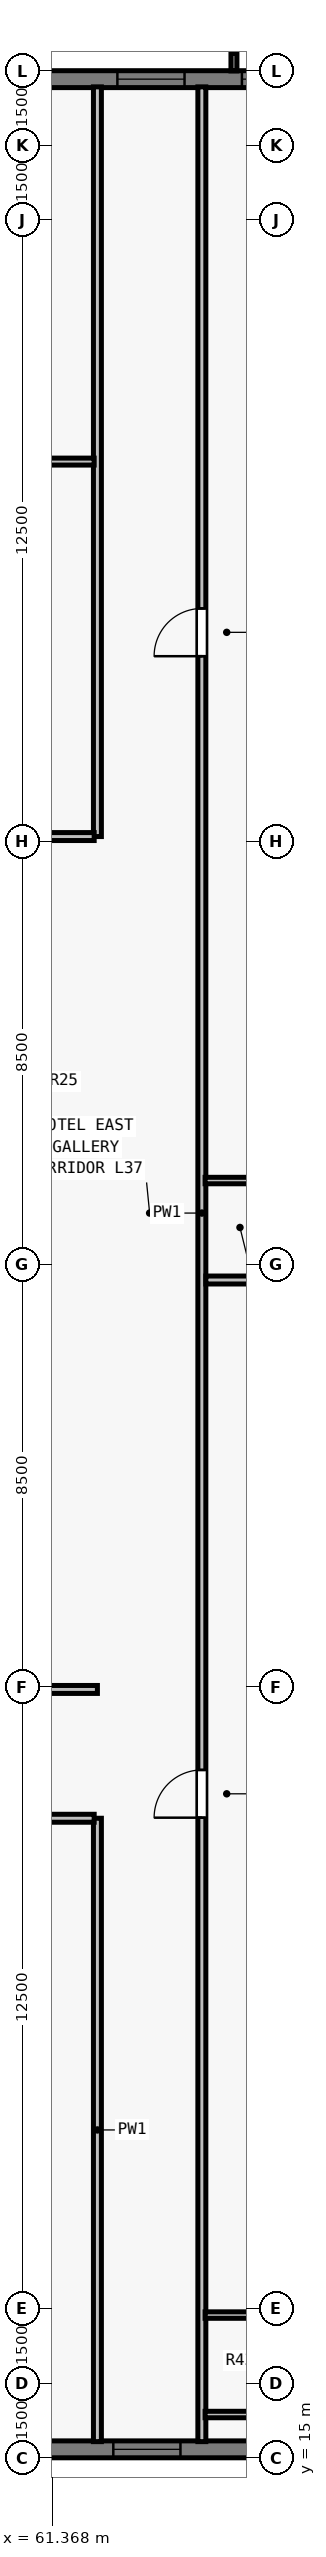
"""IFC4 building model, lengths in metres.
Left out: names, types, materials, properties, quantities, classifications, styles, units other than length and angle.
Written with IfcOpenShell. Run it as: python <this file> out.ifc"""

import sys

from ifc_helpers import new_model, si_unit, direction, frame, frame_2d, origin, place, context, subcontext, project, spatial, rectangle, extrude, element, fill, save


model = new_model("IFC4")
c1 = context("Model", 3, precision=1e-05, world=origin(), true_north=direction((0.0, 1.0)))
c2 = subcontext(c1, "Body", "Model", "MODEL_VIEW")
j1 = project(units=[si_unit("LENGTHUNIT", "METRE"), si_unit("PLANEANGLEUNIT", "RADIAN")], contexts=[c1])
p1 = place(None, origin())
s1 = spatial("IfcSite", under=j1, at=p1, CompositionType="ELEMENT")
p2 = place(p1, origin())
s2 = spatial("IfcBuilding", under=s1, at=p2, CompositionType="ELEMENT")
p3 = place(p2, frame((0.0, 0.0, 137.5)))
s3 = spatial("IfcBuildingStorey", under=s2, at=p3, CompositionType="ELEMENT", Elevation=137.5)
p4 = place(p3, frame((32.0, 62.83, 0.0), z_axis=(0.0, 0.0, 1.0), x_axis=(1.0, 0.0, 0.0)))
e1 = element("IfcWall", 1, at=p4, inside=s3, PredefinedType="SOLIDWALL", context=c2, shape_type="SweptSolid", body=[
    extrude(rectangle(XDim=39.682, YDim=0.34, at=frame_2d((19.841, 0.0))), origin(), (0.0, 0.0, 1.0), 3.28),
])
p5 = place(p4, frame((3.902, 0.0, 0.8)))
e2 = element("IfcOpeningElement", 2, at=p5, cuts=e1, PredefinedType="OPENING", context=c2, shape_type="SweptSolid", body=[
    extrude(rectangle(XDim=1.75, YDim=1.66, at=frame_2d((0.875, 0.83))), frame((0.0, 0.18, 0.0), z_axis=(0.0, -1.0, 0.0), x_axis=(1.0, 0.0, 0.0)), (0.0, 0.0, 1.0), 0.36),
])
p6 = place(p4, frame((8.505, 0.0, 0.8)))
e3 = element("IfcOpeningElement", 3, at=p6, cuts=e1, PredefinedType="OPENING", context=c2, shape_type="SweptSolid", body=[
    extrude(rectangle(XDim=1.35, YDim=1.66, at=frame_2d((0.675, 0.83))), frame((0.0, 0.18, 0.0), z_axis=(0.0, -1.0, 0.0), x_axis=(1.0, 0.0, 0.0)), (0.0, 0.0, 1.0), 0.36),
])
p7 = place(p4, frame((11.859, 0.0, 0.8)))
e4 = element("IfcOpeningElement", 4, at=p7, cuts=e1, PredefinedType="OPENING", context=c2, shape_type="SweptSolid", body=[
    extrude(rectangle(XDim=1.75, YDim=1.66, at=frame_2d((0.875, 0.83))), frame((0.0, 0.18, 0.0), z_axis=(0.0, -1.0, 0.0), x_axis=(1.0, 0.0, 0.0)), (0.0, 0.0, 1.0), 0.36),
])
p8 = place(p4, frame((16.062, 0.0, 0.8)))
e5 = element("IfcOpeningElement", 5, at=p8, cuts=e1, PredefinedType="OPENING", context=c2, shape_type="SweptSolid", body=[
    extrude(rectangle(XDim=1.35, YDim=1.66, at=frame_2d((0.675, 0.83))), frame((0.0, 0.18, 0.0), z_axis=(0.0, -1.0, 0.0), x_axis=(1.0, 0.0, 0.0)), (0.0, 0.0, 1.0), 0.36),
])
p9 = place(p4, frame((17.716, 0.0, 0.8)))
e6 = element("IfcOpeningElement", 6, at=p9, cuts=e1, PredefinedType="OPENING", context=c2, shape_type="SweptSolid", body=[
    extrude(rectangle(XDim=1.75, YDim=1.66, at=frame_2d((0.875, 0.83))), frame((0.0, 0.18, 0.0), z_axis=(0.0, -1.0, 0.0), x_axis=(1.0, 0.0, 0.0)), (0.0, 0.0, 1.0), 0.36),
])
p10 = place(p4, frame((22.719, 0.0, 0.8)))
e7 = element("IfcOpeningElement", 7, at=p10, cuts=e1, PredefinedType="OPENING", context=c2, shape_type="SweptSolid", body=[
    extrude(rectangle(XDim=1.35, YDim=1.66, at=frame_2d((0.675, 0.83))), frame((0.0, 0.18, 0.0), z_axis=(0.0, -1.0, 0.0), x_axis=(1.0, 0.0, 0.0)), (0.0, 0.0, 1.0), 0.36),
])
p11 = place(p4, frame((26.073, 0.0, 0.8)))
e8 = element("IfcOpeningElement", 8, at=p11, cuts=e1, PredefinedType="OPENING", context=c2, shape_type="SweptSolid", body=[
    extrude(rectangle(XDim=1.75, YDim=1.66, at=frame_2d((0.875, 0.83))), frame((0.0, 0.18, 0.0), z_axis=(0.0, -1.0, 0.0), x_axis=(1.0, 0.0, 0.0)), (0.0, 0.0, 1.0), 0.36),
])
p12 = place(p4, frame((30.677, 0.0, 0.8)))
e9 = element("IfcOpeningElement", 9, at=p12, cuts=e1, PredefinedType="OPENING", context=c2, shape_type="SweptSolid", body=[
    extrude(rectangle(XDim=1.35, YDim=1.66, at=frame_2d((0.675, 0.83))), frame((0.0, 0.18, 0.0), z_axis=(0.0, -1.0, 0.0), x_axis=(1.0, 0.0, 0.0)), (0.0, 0.0, 1.0), 0.36),
])
p13 = place(p4, frame((33.18, 0.0, 0.8)))
e10 = element("IfcOpeningElement", 10, at=p13, cuts=e1, PredefinedType="OPENING", context=c2, shape_type="SweptSolid", body=[
    extrude(rectangle(XDim=1.75, YDim=1.66, at=frame_2d((0.875, 0.83))), frame((0.0, 0.18, 0.0), z_axis=(0.0, -1.0, 0.0), x_axis=(1.0, 0.0, 0.0)), (0.0, 0.0, 1.0), 0.36),
])
p14 = place(p3, frame((72.0, 15.17, 0.0), z_axis=(0.0, 0.0, 1.0), x_axis=(-1.0, 0.0, 0.0)))
e11 = element("IfcWall", 11, at=p14, inside=s3, PredefinedType="SOLIDWALL", context=c2, shape_type="SweptSolid", body=[
    extrude(rectangle(XDim=39.682, YDim=0.34, at=frame_2d((19.841, 0.0))), origin(), (0.0, 0.0, 1.0), 3.28),
])
p15 = place(p14, frame((8.055, 0.0, 0.8)))
e12 = element("IfcOpeningElement", 12, at=p15, cuts=e11, PredefinedType="OPENING", context=c2, shape_type="SweptSolid", body=[
    extrude(rectangle(XDim=1.35, YDim=1.66, at=frame_2d((0.675, 0.83))), frame((0.0, 0.18, 0.0), z_axis=(0.0, -1.0, 0.0), x_axis=(1.0, 0.0, 0.0)), (0.0, 0.0, 1.0), 0.36),
])
p16 = place(p14, frame((11.859, 0.0, 0.8)))
e13 = element("IfcOpeningElement", 13, at=p16, cuts=e11, PredefinedType="OPENING", context=c2, shape_type="SweptSolid", body=[
    extrude(rectangle(XDim=1.75, YDim=1.66, at=frame_2d((0.875, 0.83))), frame((0.0, 0.18, 0.0), z_axis=(0.0, -1.0, 0.0), x_axis=(1.0, 0.0, 0.0)), (0.0, 0.0, 1.0), 0.36),
])
p17 = place(p14, frame((16.062, 0.0, 0.8)))
e14 = element("IfcOpeningElement", 14, at=p17, cuts=e11, PredefinedType="OPENING", context=c2, shape_type="SweptSolid", body=[
    extrude(rectangle(XDim=1.35, YDim=1.66, at=frame_2d((0.675, 0.83))), frame((0.0, 0.18, 0.0), z_axis=(0.0, -1.0, 0.0), x_axis=(1.0, 0.0, 0.0)), (0.0, 0.0, 1.0), 0.36),
])
p18 = place(p14, frame((18.966, 0.0, 0.8)))
e15 = element("IfcOpeningElement", 15, at=p18, cuts=e11, PredefinedType="OPENING", context=c2, shape_type="SweptSolid", body=[
    extrude(rectangle(XDim=1.75, YDim=1.66, at=frame_2d((0.875, 0.83))), frame((0.0, 0.18, 0.0), z_axis=(0.0, -1.0, 0.0), x_axis=(1.0, 0.0, 0.0)), (0.0, 0.0, 1.0), 0.36),
])
p19 = place(p14, frame((22.719, 0.0, 0.8)))
e16 = element("IfcOpeningElement", 16, at=p19, cuts=e11, PredefinedType="OPENING", context=c2, shape_type="SweptSolid", body=[
    extrude(rectangle(XDim=1.35, YDim=1.66, at=frame_2d((0.675, 0.83))), frame((0.0, 0.18, 0.0), z_axis=(0.0, -1.0, 0.0), x_axis=(1.0, 0.0, 0.0)), (0.0, 0.0, 1.0), 0.36),
])
p20 = place(p14, frame((26.523, 0.0, 0.8)))
e17 = element("IfcOpeningElement", 17, at=p20, cuts=e11, PredefinedType="OPENING", context=c2, shape_type="SweptSolid", body=[
    extrude(rectangle(XDim=1.75, YDim=1.66, at=frame_2d((0.875, 0.83))), frame((0.0, 0.18, 0.0), z_axis=(0.0, -1.0, 0.0), x_axis=(1.0, 0.0, 0.0)), (0.0, 0.0, 1.0), 0.36),
])
p21 = place(p14, frame((29.827, 0.0, 0.8)))
e18 = element("IfcOpeningElement", 18, at=p21, cuts=e11, PredefinedType="OPENING", context=c2, shape_type="SweptSolid", body=[
    extrude(rectangle(XDim=1.35, YDim=1.66, at=frame_2d((0.675, 0.83))), frame((0.0, 0.18, 0.0), z_axis=(0.0, -1.0, 0.0), x_axis=(1.0, 0.0, 0.0)), (0.0, 0.0, 1.0), 0.36),
])
p22 = place(p3, frame((64.375, 15.325, 0.0), z_axis=(0.0, 0.0, 1.0), x_axis=(0.0, 1.0, 0.0)))
e19 = element("IfcWall", 19, at=p22, inside=s3, PredefinedType="PARTITIONING", context=c2, shape_type="SweptSolid", body=[
    extrude(rectangle(XDim=47.35, YDim=0.16, at=frame_2d((23.675, 0.0))), origin(), (0.0, 0.0, 1.0), 2.555),
])
p23 = place(p22, frame((12.547, 0.0, 0.0)))
e20 = element("IfcOpeningElement", 20, at=p23, cuts=e19, PredefinedType="OPENING", context=c2, shape_type="SweptSolid", body=[
    extrude(rectangle(XDim=0.96, YDim=2.15, at=frame_2d((0.48, 1.075))), frame((0.0, 0.09, 0.0), z_axis=(0.0, -1.0, 0.0), x_axis=(1.0, 0.0, 0.0)), (0.0, 0.0, 1.0), 0.18),
])
p24 = place(p22, frame((35.902, 0.0, 0.0)))
e21 = element("IfcOpeningElement", 21, at=p24, cuts=e19, PredefinedType="OPENING", context=c2, shape_type="SweptSolid", body=[
    extrude(rectangle(XDim=0.96, YDim=2.15, at=frame_2d((0.48, 1.075))), frame((0.0, 0.09, 0.0), z_axis=(0.0, -1.0, 0.0), x_axis=(1.0, 0.0, 0.0)), (0.0, 0.0, 1.0), 0.18),
])
p25 = place(p3, frame((62.275, 15.325, 0.0), z_axis=(0.0, 0.0, 1.0), x_axis=(0.0, 1.0, 0.0)))
e22 = element("IfcWall", 22, at=p25, inside=s3, PredefinedType="PARTITIONING", context=c2, shape_type="SweptSolid", body=[
    extrude(rectangle(XDim=12.535, YDim=0.16, at=frame_2d((6.268, 0.0))), origin(), (0.0, 0.0, 1.0), 3.28),
])
p26 = place(p3, frame((62.275, 47.6, 0.0), z_axis=(0.0, 0.0, 1.0), x_axis=(0.0, 1.0, 0.0)))
e23 = element("IfcWall", 23, at=p26, inside=s3, PredefinedType="PARTITIONING", context=c2, shape_type="SweptSolid", body=[
    extrude(rectangle(XDim=15.075, YDim=0.16, at=frame_2d((7.538, 0.0))), origin(), (0.0, 0.0, 1.0), 2.555),
])
p27 = place(p3, frame((60.765, 30.45, 0.0), z_axis=(0.0, 0.0, 1.0), x_axis=(1.0, 0.0, 0.0)))
e24 = element("IfcWall", 24, at=p27, inside=s3, PredefinedType="PARTITIONING", context=c2, shape_type="SweptSolid", body=[
    extrude(rectangle(XDim=1.51, YDim=0.16, at=frame_2d((0.755, 0.0))), origin(), (0.0, 0.0, 1.0), 3.28),
])
p28 = place(p3, frame((60.765, 47.6, 0.0), z_axis=(0.0, 0.0, 1.0), x_axis=(1.0, 0.0, 0.0)))
e25 = element("IfcWall", 25, at=p28, inside=s3, PredefinedType="PARTITIONING", context=c2, shape_type="SweptSolid", body=[
    extrude(rectangle(XDim=1.445, YDim=0.16, at=frame_2d((0.723, 0.0))), origin(), (0.0, 0.0, 1.0), 3.28),
])
p29 = place(p3, frame((40.14, 27.86, 0.0), z_axis=(0.0, 0.0, 1.0), x_axis=(1.0, 0.0, 0.0)))
e26 = element("IfcWall", 26, at=p29, inside=s3, PredefinedType="PARTITIONING", context=c2, shape_type="SweptSolid", body=[
    extrude(rectangle(XDim=22.07, YDim=0.16, at=frame_2d((11.035, 0.0))), origin(), (0.0, 0.0, 1.0), 3.28),
])
p30 = place(p29, frame((3.834, 0.0, 0.0)))
e27 = element("IfcOpeningElement", 27, at=p30, cuts=e26, PredefinedType="OPENING", context=c2, shape_type="SweptSolid", body=[
    extrude(rectangle(XDim=0.96, YDim=2.15, at=frame_2d((0.48, 1.075))), frame((0.0, 0.09, 0.0), z_axis=(0.0, -1.0, 0.0), x_axis=(1.0, 0.0, 0.0)), (0.0, 0.0, 1.0), 0.18),
])
p31 = place(p29, frame((8.746, 0.0, 0.0)))
e28 = element("IfcOpeningElement", 28, at=p31, cuts=e26, PredefinedType="OPENING", context=c2, shape_type="SweptSolid", body=[
    extrude(rectangle(XDim=0.96, YDim=2.15, at=frame_2d((0.48, 1.075))), frame((0.0, 0.09, 0.0), z_axis=(0.0, -1.0, 0.0), x_axis=(1.0, 0.0, 0.0)), (0.0, 0.0, 1.0), 0.18),
])
p32 = place(p29, frame((14.46, 0.0, 0.0)))
e29 = element("IfcOpeningElement", 29, at=p32, cuts=e26, PredefinedType="OPENING", context=c2, shape_type="SweptSolid", body=[
    extrude(rectangle(XDim=0.96, YDim=2.15, at=frame_2d((0.48, 1.075))), frame((0.0, 0.09, 0.0), z_axis=(0.0, -1.0, 0.0), x_axis=(1.0, 0.0, 0.0)), (0.0, 0.0, 1.0), 0.18),
])
p33 = place(p29, frame((19.993, 0.0, 0.0)))
e30 = element("IfcOpeningElement", 30, at=p33, cuts=e26, PredefinedType="OPENING", context=c2, shape_type="SweptSolid", body=[
    extrude(rectangle(XDim=0.96, YDim=2.15, at=frame_2d((0.48, 1.075))), frame((0.0, 0.09, 0.0), z_axis=(0.0, -1.0, 0.0), x_axis=(1.0, 0.0, 0.0)), (0.0, 0.0, 1.0), 0.18),
])
p34 = place(p3, frame((40.14, 55.14, 0.0), z_axis=(0.0, 0.0, 1.0), x_axis=(1.0, 0.0, 0.0)))
e31 = element("IfcWall", 31, at=p34, inside=s3, PredefinedType="PARTITIONING", context=c2, shape_type="SweptSolid", body=[
    extrude(rectangle(XDim=22.07, YDim=0.14, at=frame_2d((11.035, 0.0))), origin(), (0.0, 0.0, 1.0), 3.28),
])
p35 = place(p34, frame((3.435, 0.0, 0.0)))
e32 = element("IfcOpeningElement", 32, at=p35, cuts=e31, PredefinedType="OPENING", context=c2, shape_type="SweptSolid", body=[
    extrude(rectangle(XDim=0.92, YDim=2.12, at=frame_2d((0.46, 1.06))), frame((0.0, 0.08, 0.0), z_axis=(0.0, -1.0, 0.0), x_axis=(1.0, 0.0, 0.0)), (0.0, 0.0, 1.0), 0.16),
])
p36 = place(p34, frame((14.435, 0.0, 0.0)))
e33 = element("IfcOpeningElement", 33, at=p36, cuts=e31, PredefinedType="OPENING", context=c2, shape_type="SweptSolid", body=[
    extrude(rectangle(XDim=0.92, YDim=2.12, at=frame_2d((0.46, 1.06))), frame((0.0, 0.08, 0.0), z_axis=(0.0, -1.0, 0.0), x_axis=(1.0, 0.0, 0.0)), (0.0, 0.0, 1.0), 0.16),
])
for number, where, z_axis, x_axis in (
    (34, (64.44, 15.87, 0.0), (0.0, 0.0, 1.0), (1.0, 0.0, 0.0)),
    (35, (64.44, 17.87, 0.0), (0.0, 0.0, 1.0), (1.0, 0.0, 0.0)),
):
    element("IfcWall", number, at=place(p3, frame(where, z_axis=z_axis, x_axis=x_axis)), inside=s3, PredefinedType="PLUMBINGWALL", context=c2, shape_type="SweptSolid", body=[
        extrude(rectangle(XDim=2.315, YDim=0.13, at=frame_2d((1.157, 0.0))), origin(), (0.0, 0.0, 1.0), 3.28),
    ])
p37 = place(p3, frame((64.455, 38.683, 0.0), z_axis=(0.0, 0.0, 1.0), x_axis=(1.0, 0.0, 0.0)))
e36 = element("IfcWall", 36, at=p37, inside=s3, PredefinedType="PARTITIONING", context=c2, shape_type="SweptSolid", body=[
    extrude(rectangle(XDim=11.22, YDim=0.16, at=frame_2d((5.61, 0.0))), origin(), (0.0, 0.0, 1.0), 3.28),
])
p38 = place(p3, frame((64.44, 40.683, 0.0), z_axis=(0.0, 0.0, 1.0), x_axis=(1.0, 0.0, 0.0)))
e37 = element("IfcWall", 37, at=p38, inside=s3, PredefinedType="PLUMBINGWALL", context=c2, shape_type="SweptSolid", body=[
    extrude(rectangle(XDim=2.315, YDim=0.13, at=frame_2d((1.157, 0.0))), origin(), (0.0, 0.0, 1.0), 3.28),
])
p39 = place(p12, origin())
e38 = element("IfcWindow", 38, at=p39, inside=s3, PartitioningType="SINGLE_PANEL", PredefinedType="WINDOW", context=c2, shape_type="SweptSolid", body=[
    extrude(rectangle(XDim=1.35, YDim=1.66, at=frame_2d((0.675, 0.83))), frame((0.0, -0.05, 0.0), z_axis=(0.0, -1.0, 0.0), x_axis=(1.0, 0.0, 0.0)), (0.0, 0.0, 1.0), 0.06),
])
fill(e9, e38)
p40 = place(p13, origin())
e39 = element("IfcWindow", 39, at=p40, inside=s3, PartitioningType="SINGLE_PANEL", PredefinedType="WINDOW", context=c2, shape_type="SweptSolid", body=[
    extrude(rectangle(XDim=1.75, YDim=1.66, at=frame_2d((0.875, 0.83))), frame((0.0, -0.05, 0.0), z_axis=(0.0, -1.0, 0.0), x_axis=(1.0, 0.0, 0.0)), (0.0, 0.0, 1.0), 0.06),
])
fill(e10, e39)
p41 = place(p15, origin())
e40 = element("IfcWindow", 40, at=p41, inside=s3, PartitioningType="SINGLE_PANEL", PredefinedType="WINDOW", context=c2, shape_type="SweptSolid", body=[
    extrude(rectangle(XDim=1.35, YDim=1.66, at=frame_2d((0.675, 0.83))), frame((0.0, -0.05, 0.0), z_axis=(0.0, -1.0, 0.0), x_axis=(1.0, 0.0, 0.0)), (0.0, 0.0, 1.0), 0.06),
])
fill(e12, e40)
p42 = place(p23, origin())
e41 = element("IfcDoor", 41, at=p42, inside=s3, OperationType="SINGLE_SWING_LEFT", PredefinedType="DOOR", context=c2, shape_type="SweptSolid", body=[
    extrude(rectangle(XDim=0.96, YDim=2.15, at=frame_2d((0.48, 1.075))), frame((0.0, 0.025, 0.0), z_axis=(0.0, -1.0, 0.0), x_axis=(1.0, 0.0, 0.0)), (0.0, 0.0, 1.0), 0.05),
])
fill(e20, e41)
p43 = place(p24, origin())
e42 = element("IfcDoor", 42, at=p43, inside=s3, OperationType="SINGLE_SWING_LEFT", PredefinedType="DOOR", context=c2, shape_type="SweptSolid", body=[
    extrude(rectangle(XDim=0.96, YDim=2.15, at=frame_2d((0.48, 1.075))), frame((0.0, 0.025, 0.0), z_axis=(0.0, -1.0, 0.0), x_axis=(1.0, 0.0, 0.0)), (0.0, 0.0, 1.0), 0.05),
])
fill(e21, e42)
save(model, sys.argv[1])
